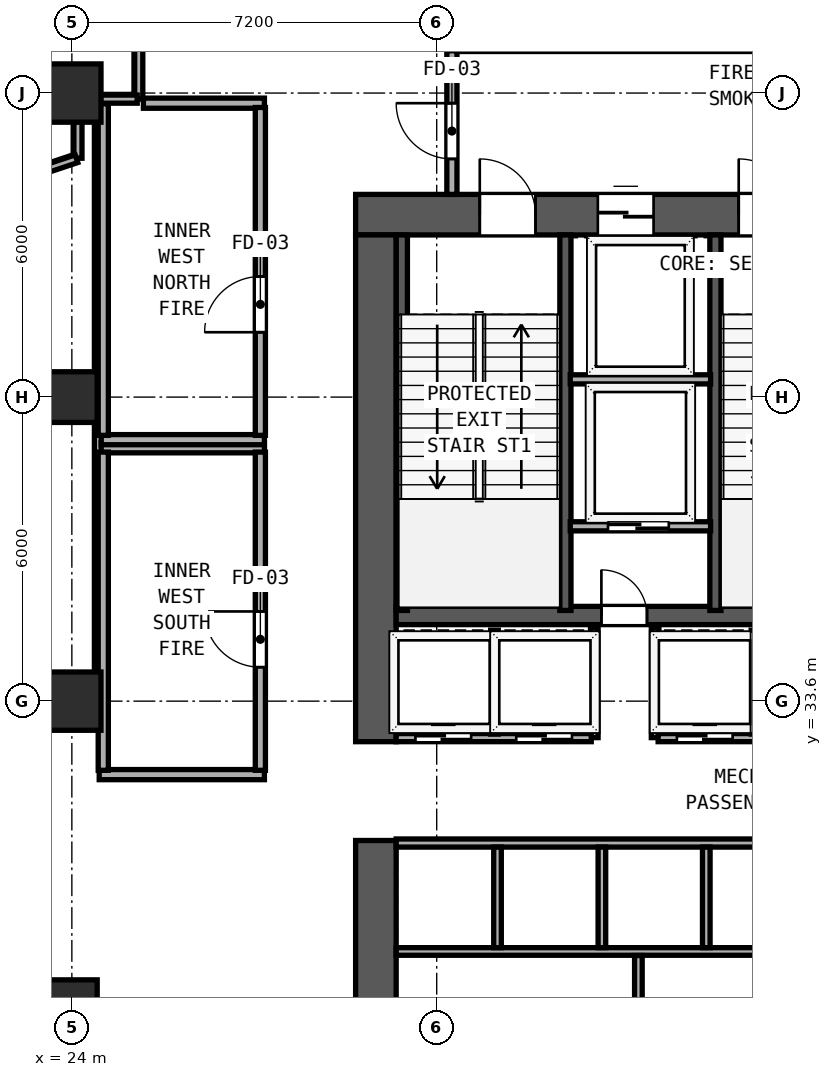
"""IFC4 building model, lengths in metres.
Left out: names, types, materials, properties, quantities, classifications, styles, units other than length and angle.
Written with IfcOpenShell. Run it as: python <this file> out.ifc"""

import sys

from ifc_helpers import new_model, si_unit, direction, frame, frame_2d, origin, origin_2d, place, context, subcontext, project, spatial, rectangle, hollow_rectangle, extrude, element, fill, save


model = new_model("IFC4")
c1 = context("Model", 3, precision=1e-05, world=origin(), true_north=direction((0.0, 1.0)))
c2 = subcontext(c1, "Body", "Model", "MODEL_VIEW")
j1 = project(units=[si_unit("LENGTHUNIT", "METRE"), si_unit("PLANEANGLEUNIT", "RADIAN")], contexts=[c1])
p1 = place(None, origin())
s1 = spatial("IfcSite", under=j1, at=p1, CompositionType="ELEMENT")
p2 = place(p1, origin())
s2 = spatial("IfcBuilding", under=s1, at=p2, CompositionType="ELEMENT")
p3 = place(p2, frame((0.0, 0.0, 89.4)))
s3 = spatial("IfcBuildingStorey", under=s2, at=p3, CompositionType="ELEMENT", Elevation=89.4)
p4 = place(p3, frame((29.6, 43.2, 0.0), z_axis=(0.0, 0.0, 1.0), x_axis=(1.0, 0.0, 0.0)))
e1 = element("IfcWall", 1, at=p4, inside=s3, PredefinedType="SHEAR", context=c2, shape_type="SweptSolid", body=[
    extrude(rectangle(XDim=17.6, YDim=0.8, at=frame_2d((8.8, 0.0))), origin(), (0.0, 0.0, 1.0), 4.35),
])
p5 = place(p4, frame((2.45, 0.0, 0.0)))
e2 = element("IfcOpeningElement", 2, at=p5, cuts=e1, PredefinedType="OPENING", context=c2, shape_type="SweptSolid", body=[
    extrude(rectangle(XDim=1.1, YDim=2.15, at=frame_2d((0.55, 1.075))), frame((0.0, 0.41, 0.0), z_axis=(0.0, -1.0, 0.0), x_axis=(1.0, 0.0, 0.0)), (0.0, 0.0, 1.0), 0.82),
])
p6 = place(p4, frame((7.56, 0.0, 0.0)))
e3 = element("IfcOpeningElement", 3, at=p6, cuts=e1, PredefinedType="OPENING", context=c2, shape_type="SweptSolid", body=[
    extrude(rectangle(XDim=1.1, YDim=2.15, at=frame_2d((0.55, 1.075))), frame((0.0, 0.41, 0.0), z_axis=(0.0, -1.0, 0.0), x_axis=(1.0, 0.0, 0.0)), (0.0, 0.0, 1.0), 0.82),
])
p7 = place(p4, frame((13.65, 0.0, 0.0)))
e4 = element("IfcOpeningElement", 4, at=p7, cuts=e1, PredefinedType="OPENING", context=c2, shape_type="SweptSolid", body=[
    extrude(rectangle(XDim=1.1, YDim=2.15, at=frame_2d((0.55, 1.075))), frame((0.0, 0.41, 0.0), z_axis=(0.0, -1.0, 0.0), x_axis=(1.0, 0.0, 0.0)), (0.0, 0.0, 1.0), 0.82),
])
p8 = place(p4, frame((4.78, 0.0, 0.0)))
e5 = element("IfcOpeningElement", 5, at=p8, cuts=e1, PredefinedType="OPENING", context=c2, shape_type="SweptSolid", body=[
    extrude(rectangle(XDim=1.1, YDim=2.2, at=frame_2d((0.55, 1.1))), frame((0.0, 0.41, 0.0), z_axis=(0.0, -1.0, 0.0), x_axis=(1.0, 0.0, 0.0)), (0.0, 0.0, 1.0), 0.82),
])
p9 = place(p4, frame((11.14, 0.0, 0.0)))
e6 = element("IfcOpeningElement", 6, at=p9, cuts=e1, PredefinedType="OPENING", context=c2, shape_type="SweptSolid", body=[
    extrude(rectangle(XDim=1.1, YDim=2.2, at=frame_2d((0.55, 1.1))), frame((0.0, 0.41, 0.0), z_axis=(0.0, -1.0, 0.0), x_axis=(1.0, 0.0, 0.0)), (0.0, 0.0, 1.0), 0.82),
])
p10 = place(p3, frame((30.0, 26.8, 0.0), z_axis=(0.0, 0.0, 1.0), x_axis=(0.0, 1.0, 0.0)))
e7 = element("IfcWall", 7, at=p10, inside=s3, PredefinedType="SHEAR", context=c2, shape_type="SweptSolid", body=[
    extrude(rectangle(XDim=4.05, YDim=0.8, at=frame_2d((2.025, 0.0))), origin(), (0.0, 0.0, 1.0), 4.35),
])
p11 = place(p3, frame((30.0, 32.8, 0.0), z_axis=(0.0, 0.0, 1.0), x_axis=(0.0, 1.0, 0.0)))
e8 = element("IfcWall", 8, at=p11, inside=s3, PredefinedType="SHEAR", context=c2, shape_type="SweptSolid", body=[
    extrude(rectangle(XDim=10.0, YDim=0.8, at=frame_2d((5.0, 0.0))), origin(), (0.0, 0.0, 1.0), 4.35),
])
p12 = place(p3, frame((30.4, 35.29, 0.0), z_axis=(0.0, 0.0, 1.0), x_axis=(1.0, 0.0, 0.0)))
e9 = element("IfcWall", 9, at=p12, inside=s3, PredefinedType="SHEAR", context=c2, shape_type="SweptSolid", body=[
    extrude(rectangle(XDim=16.0, YDim=0.36, at=frame_2d((8.0, 0.0))), origin(), (0.0, 0.0, 1.0), 4.35),
])
p13 = place(p12, frame((4.95, 0.0, 0.0), z_axis=(0.0, 0.0, 1.0), x_axis=(-1.0, 0.0, 0.0)))
e10 = element("IfcOpeningElement", 10, at=p13, cuts=e9, PredefinedType="OPENING", context=c2, shape_type="SweptSolid", body=[
    extrude(rectangle(XDim=0.9, YDim=2.1, at=frame_2d((0.45, 1.05))), frame((0.0, 0.19, 0.0), z_axis=(0.0, -1.0, 0.0), x_axis=(1.0, 0.0, 0.0)), (0.0, 0.0, 1.0), 0.38),
])
p14 = place(p12, frame((12.01, 0.0, 0.0), z_axis=(0.0, 0.0, 1.0), x_axis=(-1.0, 0.0, 0.0)))
e11 = element("IfcOpeningElement", 11, at=p14, cuts=e9, PredefinedType="OPENING", context=c2, shape_type="SweptSolid", body=[
    extrude(rectangle(XDim=0.9, YDim=2.1, at=frame_2d((0.45, 1.05))), frame((0.0, 0.19, 0.0), z_axis=(0.0, -1.0, 0.0), x_axis=(1.0, 0.0, 0.0)), (0.0, 0.0, 1.0), 0.38),
])
for number, where, z_axis, x_axis in (
    (12, (30.512, 35.39, 0.0), (0.0, 0.0, 1.0), (0.0, 1.0, 0.0)),
    (13, (33.74, 35.39, 0.0), (0.0, 0.0, 1.0), (0.0, 1.0, 0.0)),
    (14, (36.7, 35.39, 0.0), (0.0, 0.0, 1.0), (0.0, 1.0, 0.0)),
):
    element("IfcWall", number, at=place(p3, frame(where, z_axis=z_axis, x_axis=x_axis)), inside=s3, PredefinedType="SHEAR", context=c2, shape_type="SweptSolid", body=[
        extrude(rectangle(XDim=7.41, YDim=0.22, at=frame_2d((3.705, 0.0))), origin(), (0.0, 0.0, 1.0), 4.35),
    ])
for number, where, z_axis, x_axis in (
    (15, (24.0, 33.6, 0.0), (0.0, 0.0, 1.0), (1.0, 0.0, 0.0)),
    (16, (24.0, 45.6, 0.0), (0.0, 0.0, 1.0), (1.0, 0.0, 0.0)),
):
    element("IfcColumn", number, at=place(p3, frame(where, z_axis=z_axis, x_axis=x_axis)), inside=s3, PredefinedType="COLUMN", context=c2, shape_type="SweptSolid", body=[
        extrude(hollow_rectangle(XDim=1.15, YDim=1.15, WallThickness=0.042, at=origin_2d()), origin(), (0.0, 0.0, 1.0), 4.6),
    ])
for number, where, z_axis, x_axis in (
    (17, (24.0, 27.6, 0.0), (0.0, 0.0, 1.0), (1.0, 0.0, 0.0)),
    (18, (24.0, 39.6, 0.0), (0.0, 0.0, 1.0), (1.0, 0.0, 0.0)),
):
    element("IfcColumn", number, at=place(p3, frame(where, z_axis=z_axis, x_axis=x_axis)), inside=s3, PredefinedType="COLUMN", context=c2, shape_type="SweptSolid", body=[
        extrude(hollow_rectangle(XDim=1.0, YDim=1.0, WallThickness=0.038, at=origin_2d()), origin(), (0.0, 0.0, 1.0), 4.6),
    ])
p15 = place(p3, frame((25.32, 46.65, 0.0), z_axis=(0.0, 0.0, 1.0), x_axis=(0.0, -1.0, 0.0)))
e19 = element("IfcWall", 19, at=p15, inside=s3, PredefinedType="PARAPET", context=c2, shape_type="SweptSolid", body=[
    extrude(rectangle(XDim=1.17, YDim=0.16, at=frame_2d((0.585, 0.0))), origin(), (0.0, 0.0, 1.0), 1.15),
])
p16 = place(p3, frame((25.29, 45.48, 0.0), z_axis=(0.0, 0.0, 1.0), x_axis=(-1.0, 0.0, 0.0)))
e20 = element("IfcWall", 20, at=p16, inside=s3, PredefinedType="PARAPET", context=c2, shape_type="SweptSolid", body=[
    extrude(rectangle(XDim=0.723, YDim=0.16, at=frame_2d((0.362, 0.0))), origin(), (0.0, 0.0, 1.0), 1.15),
])
p17 = place(p3, frame((24.12, 45.033, 0.0), z_axis=(0.0, 0.0, 1.0), x_axis=(0.0, -1.0, 0.0)))
e21 = element("IfcWall", 21, at=p17, inside=s3, PredefinedType="PARAPET", context=c2, shape_type="SweptSolid", body=[
    extrude(rectangle(XDim=0.719, YDim=0.16, at=frame_2d((0.36, 0.0))), origin(), (0.0, 0.0, 1.0), 1.15),
])
p18 = place(p3, frame((24.092, 44.304, 0.0), z_axis=(0.0, 0.0, 1.0), x_axis=(-0.948683298051, -0.316227766017, 0.0)))
e22 = element("IfcWall", 22, at=p18, inside=s3, PredefinedType="PARAPET", context=c2, shape_type="SweptSolid", body=[
    extrude(rectangle(XDim=5.73, YDim=0.16, at=frame_2d((2.865, 0.0))), origin(), (0.0, 0.0, 1.0), 1.15),
])
p19 = place(p3, frame((31.5, 43.6, 0.0), z_axis=(0.0, 0.0, 1.0), x_axis=(0.0, 1.0, 0.0)))
e23 = element("IfcWall", 23, at=p19, inside=s3, PredefinedType="SOLIDWALL", context=c2, shape_type="SweptSolid", body=[
    extrude(rectangle(XDim=2.835, YDim=0.2, at=frame_2d((1.417, 0.0))), origin(), (0.0, 0.0, 1.0), 4.35),
])
p20 = place(p19, frame((1.8, 0.0, 0.0), z_axis=(0.0, 0.0, 1.0), x_axis=(-1.0, 0.0, 0.0)))
e24 = element("IfcOpeningElement", 24, at=p20, cuts=e23, PredefinedType="OPENING", context=c2, shape_type="SweptSolid", body=[
    extrude(rectangle(XDim=1.1, YDim=2.15, at=frame_2d((0.55, 1.075))), frame((0.0, 0.11, 0.0), z_axis=(0.0, -1.0, 0.0), x_axis=(1.0, 0.0, 0.0)), (0.0, 0.0, 1.0), 0.22),
])
p21 = place(p3, frame((33.835, 39.95, 0.0), z_axis=(0.0, 0.0, 1.0), x_axis=(1.0, 0.0, 0.0)))
e25 = element("IfcWall", 25, at=p21, inside=s3, PredefinedType="SOLIDWALL", context=c2, shape_type="SweptSolid", body=[
    extrude(rectangle(XDim=2.77, YDim=0.18, at=frame_2d((1.385, 0.0))), origin(), (0.0, 0.0, 1.0), 4.35),
])
p22 = place(p3, frame((33.835, 37.05, 0.0), z_axis=(0.0, 0.0, 1.0), x_axis=(1.0, 0.0, 0.0)))
e26 = element("IfcWall", 26, at=p22, inside=s3, PredefinedType="SOLIDWALL", context=c2, shape_type="SweptSolid", body=[
    extrude(rectangle(XDim=2.77, YDim=0.18, at=frame_2d((1.385, 0.0))), origin(), (0.0, 0.0, 1.0), 4.35),
])
p23 = place(p22, frame((1.945, 0.0, 0.0), z_axis=(0.0, 0.0, 1.0), x_axis=(-1.0, 0.0, 0.0)))
e27 = element("IfcOpeningElement", 27, at=p23, cuts=e26, PredefinedType="OPENING", context=c2, shape_type="SweptSolid", body=[
    extrude(rectangle(XDim=1.2, YDim=2.2, at=frame_2d((0.6, 1.1))), frame((0.0, 0.1, 0.0), z_axis=(0.0, -1.0, 0.0), x_axis=(1.0, 0.0, 0.0)), (0.0, 0.0, 1.0), 0.2),
])
for number, where, z_axis, x_axis in (
    (28, (34.31, 32.88, 0.0), (0.0, 0.0, 1.0), (0.0, 1.0, 0.0)),
    (29, (35.51, 32.88, 0.0), (0.0, 0.0, 1.0), (0.0, 1.0, 0.0)),
):
    element("IfcWall", number, at=place(p3, frame(where, z_axis=z_axis, x_axis=x_axis)), inside=s3, PredefinedType="SOLIDWALL", context=c2, shape_type="SweptSolid", body=[
        extrude(rectangle(XDim=2.17, YDim=0.15, at=frame_2d((1.085, 0.0))), origin(), (0.0, 0.0, 1.0), 4.35),
    ])
p24 = place(p3, frame((30.4, 32.88, 0.0), z_axis=(0.0, 0.0, 1.0), x_axis=(1.0, 0.0, 0.0)))
e30 = element("IfcWall", 30, at=p24, inside=s3, PredefinedType="SOLIDWALL", context=c2, shape_type="SweptSolid", body=[
    extrude(rectangle(XDim=3.85, YDim=0.16, at=frame_2d((1.925, 0.0))), origin(), (0.0, 0.0, 1.0), 4.35),
])
p25 = place(p24, frame((1.48, 0.0, 0.0), z_axis=(0.0, 0.0, 1.0), x_axis=(-1.0, 0.0, 0.0)))
e31 = element("IfcOpeningElement", 31, at=p25, cuts=e30, PredefinedType="OPENING", context=c2, shape_type="SweptSolid", body=[
    extrude(rectangle(XDim=1.1, YDim=2.2, at=frame_2d((0.55, 1.1))), frame((0.0, 0.09, 0.0), z_axis=(0.0, -1.0, 0.0), x_axis=(1.0, 0.0, 0.0)), (0.0, 0.0, 1.0), 0.18),
])
p26 = place(p24, frame((3.47, 0.0, 0.0), z_axis=(0.0, 0.0, 1.0), x_axis=(-1.0, 0.0, 0.0)))
e32 = element("IfcOpeningElement", 32, at=p26, cuts=e30, PredefinedType="OPENING", context=c2, shape_type="SweptSolid", body=[
    extrude(rectangle(XDim=1.1, YDim=2.2, at=frame_2d((0.55, 1.1))), frame((0.0, 0.09, 0.0), z_axis=(0.0, -1.0, 0.0), x_axis=(1.0, 0.0, 0.0)), (0.0, 0.0, 1.0), 0.18),
])
p27 = place(p3, frame((35.57, 32.88, 0.0), z_axis=(0.0, 0.0, 1.0), x_axis=(1.0, 0.0, 0.0)))
e33 = element("IfcWall", 33, at=p27, inside=s3, PredefinedType="SOLIDWALL", context=c2, shape_type="SweptSolid", body=[
    extrude(rectangle(XDim=5.74, YDim=0.16, at=frame_2d((2.87, 0.0))), origin(), (0.0, 0.0, 1.0), 4.35),
])
p28 = place(p27, frame((1.47, 0.0, 0.0), z_axis=(0.0, 0.0, 1.0), x_axis=(-1.0, 0.0, 0.0)))
e34 = element("IfcOpeningElement", 34, at=p28, cuts=e33, PredefinedType="OPENING", context=c2, shape_type="SweptSolid", body=[
    extrude(rectangle(XDim=1.1, YDim=2.2, at=frame_2d((0.55, 1.1))), frame((0.0, 0.09, 0.0), z_axis=(0.0, -1.0, 0.0), x_axis=(1.0, 0.0, 0.0)), (0.0, 0.0, 1.0), 0.18),
])
p29 = place(p27, frame((3.46, 0.0, 0.0), z_axis=(0.0, 0.0, 1.0), x_axis=(-1.0, 0.0, 0.0)))
e35 = element("IfcOpeningElement", 35, at=p29, cuts=e33, PredefinedType="OPENING", context=c2, shape_type="SweptSolid", body=[
    extrude(rectangle(XDim=1.1, YDim=2.2, at=frame_2d((0.55, 1.1))), frame((0.0, 0.09, 0.0), z_axis=(0.0, -1.0, 0.0), x_axis=(1.0, 0.0, 0.0)), (0.0, 0.0, 1.0), 0.18),
])
for number, where, z_axis, x_axis in (
    (36, (32.34, 32.95, 0.0), (0.0, 0.0, 1.0), (0.0, 1.0, 0.0)),
    (37, (37.48, 32.95, 0.0), (0.0, 0.0, 1.0), (0.0, 1.0, 0.0)),
):
    element("IfcWall", number, at=place(p3, frame(where, z_axis=z_axis, x_axis=x_axis)), inside=s3, PredefinedType="SOLIDWALL", context=c2, shape_type="SweptSolid", body=[
        extrude(rectangle(XDim=2.05, YDim=0.15, at=frame_2d((1.025, 0.0))), origin(), (0.0, 0.0, 1.0), 4.35),
    ])
p30 = place(p3, frame((30.4, 30.8, 0.0), z_axis=(0.0, 0.0, 1.0), x_axis=(1.0, 0.0, 0.0)))
e38 = element("IfcWall", 38, at=p30, inside=s3, PredefinedType="SOLIDWALL", context=c2, shape_type="SweptSolid", body=[
    extrude(rectangle(XDim=16.0, YDim=0.16, at=frame_2d((8.0, 0.0))), origin(), (0.0, 0.0, 1.0), 4.35),
])
p31 = place(p3, frame((30.4, 28.66, 0.0), z_axis=(0.0, 0.0, 1.0), x_axis=(1.0, 0.0, 0.0)))
e39 = element("IfcWall", 39, at=p31, inside=s3, PredefinedType="PARTITIONING", context=c2, shape_type="SweptSolid", body=[
    extrude(rectangle(XDim=16.0, YDim=0.15, at=frame_2d((8.0, 0.0))), origin(), (0.0, 0.0, 1.0), 4.35),
])
for number, where, z_axis, x_axis in (
    (40, (32.4, 28.735, 0.0), (0.0, 0.0, 1.0), (0.0, 1.0, 0.0)),
    (41, (34.46, 28.735, 0.0), (0.0, 0.0, 1.0), (0.0, 1.0, 0.0)),
    (42, (36.52, 28.735, 0.0), (0.0, 0.0, 1.0), (0.0, 1.0, 0.0)),
):
    element("IfcWall", number, at=place(p3, frame(where, z_axis=z_axis, x_axis=x_axis)), inside=s3, PredefinedType="SOLIDWALL", context=c2, shape_type="SweptSolid", body=[
        extrude(rectangle(XDim=1.985, YDim=0.15, at=frame_2d((0.992, 0.0))), origin(), (0.0, 0.0, 1.0), 4.35),
    ])
p32 = place(p3, frame((35.18, 26.81, 0.0), z_axis=(0.0, 0.0, 1.0), x_axis=(0.0, 1.0, 0.0)))
e43 = element("IfcWall", 43, at=p32, inside=s3, PredefinedType="PARTITIONING", context=c2, shape_type="SweptSolid", body=[
    extrude(rectangle(XDim=1.77, YDim=0.15, at=frame_2d((0.885, 0.0))), origin(), (0.0, 0.0, 1.0), 4.35),
])
p33 = place(p3, frame((24.52, 33.6, 0.0), z_axis=(0.0, 0.0, 1.0), x_axis=(0.0, 1.0, 0.0)))
e44 = element("IfcWall", 44, at=p33, inside=s3, PredefinedType="PARTITIONING", context=c2, shape_type="SweptSolid", body=[
    extrude(rectangle(XDim=11.788, YDim=0.15, at=frame_2d((5.894, 0.0))), origin(), (0.0, 0.0, 1.0), 4.35),
])
p34 = place(p3, frame((24.58, 38.6, 0.0), z_axis=(0.0, 0.0, 1.0), x_axis=(1.0, 0.0, 0.0)))
e45 = element("IfcWall", 45, at=p34, inside=s3, PredefinedType="SOLIDWALL", context=c2, shape_type="SweptSolid", body=[
    extrude(rectangle(XDim=3.22, YDim=0.2, at=frame_2d((1.61, 0.0))), origin(), (0.0, 0.0, 1.0), 4.35),
])
p35 = place(p3, frame((24.54, 32.15, 0.0), z_axis=(0.0, 0.0, 1.0), x_axis=(1.0, 0.0, 0.0)))
e46 = element("IfcWall", 46, at=p35, inside=s3, PredefinedType="SOLIDWALL", context=c2, shape_type="SweptSolid", body=[
    extrude(rectangle(XDim=3.26, YDim=0.2, at=frame_2d((1.63, 0.0))), origin(), (0.0, 0.0, 1.0), 4.35),
])
p36 = place(p3, frame((24.62, 32.235, 0.0), z_axis=(0.0, 0.0, 1.0), x_axis=(0.0, 1.0, 0.0)))
e47 = element("IfcWall", 47, at=p36, inside=s3, PredefinedType="SOLIDWALL", context=c2, shape_type="SweptSolid", body=[
    extrude(rectangle(XDim=6.28, YDim=0.2, at=frame_2d((3.14, 0.0))), origin(), (0.0, 0.0, 1.0), 4.35),
])
p37 = place(p3, frame((27.72, 32.235, 0.0), z_axis=(0.0, 0.0, 1.0), x_axis=(0.0, 1.0, 0.0)))
e48 = element("IfcWall", 48, at=p37, inside=s3, PredefinedType="SOLIDWALL", context=c2, shape_type="SweptSolid", body=[
    extrude(rectangle(XDim=6.28, YDim=0.2, at=frame_2d((3.14, 0.0))), origin(), (0.0, 0.0, 1.0), 4.35),
])
p38 = place(p37, frame((3.135, 0.0, 0.0), z_axis=(0.0, 0.0, 1.0), x_axis=(-1.0, 0.0, 0.0)))
e49 = element("IfcOpeningElement", 49, at=p38, cuts=e48, PredefinedType="OPENING", context=c2, shape_type="SweptSolid", body=[
    extrude(rectangle(XDim=1.1, YDim=2.15, at=frame_2d((0.55, 1.075))), frame((0.0, 0.11, 0.0), z_axis=(0.0, -1.0, 0.0), x_axis=(1.0, 0.0, 0.0)), (0.0, 0.0, 1.0), 0.22),
])
p39 = place(p3, frame((25.412, 45.4, 0.0), z_axis=(0.0, 0.0, 1.0), x_axis=(1.0, 0.0, 0.0)))
e50 = element("IfcWall", 50, at=p39, inside=s3, PredefinedType="SOLIDWALL", context=c2, shape_type="SweptSolid", body=[
    extrude(rectangle(XDim=2.388, YDim=0.2, at=frame_2d((1.194, 0.0))), origin(), (0.0, 0.0, 1.0), 4.35),
])
p40 = place(p3, frame((24.58, 38.76, 0.0), z_axis=(0.0, 0.0, 1.0), x_axis=(1.0, 0.0, 0.0)))
e51 = element("IfcWall", 51, at=p40, inside=s3, PredefinedType="SOLIDWALL", context=c2, shape_type="SweptSolid", body=[
    extrude(rectangle(XDim=3.22, YDim=0.2, at=frame_2d((1.61, 0.0))), origin(), (0.0, 0.0, 1.0), 4.35),
])
p41 = place(p3, frame((24.62, 38.845, 0.0), z_axis=(0.0, 0.0, 1.0), x_axis=(0.0, 1.0, 0.0)))
e52 = element("IfcWall", 52, at=p41, inside=s3, PredefinedType="SOLIDWALL", context=c2, shape_type="SweptSolid", body=[
    extrude(rectangle(XDim=6.543, YDim=0.2, at=frame_2d((3.271, 0.0))), origin(), (0.0, 0.0, 1.0), 4.35),
])
p42 = place(p3, frame((27.72, 38.845, 0.0), z_axis=(0.0, 0.0, 1.0), x_axis=(0.0, 1.0, 0.0)))
e53 = element("IfcWall", 53, at=p42, inside=s3, PredefinedType="SOLIDWALL", context=c2, shape_type="SweptSolid", body=[
    extrude(rectangle(XDim=6.47, YDim=0.2, at=frame_2d((3.235, 0.0))), origin(), (0.0, 0.0, 1.0), 4.35),
])
p43 = place(p42, frame((3.135, 0.0, 0.0), z_axis=(0.0, 0.0, 1.0), x_axis=(-1.0, 0.0, 0.0)))
e54 = element("IfcOpeningElement", 54, at=p43, cuts=e53, PredefinedType="OPENING", context=c2, shape_type="SweptSolid", body=[
    extrude(rectangle(XDim=1.1, YDim=2.15, at=frame_2d((0.55, 1.075))), frame((0.0, 0.11, 0.0), z_axis=(0.0, -1.0, 0.0), x_axis=(1.0, 0.0, 0.0)), (0.0, 0.0, 1.0), 0.22),
])
p44 = place(p5, origin())
e55 = element("IfcDoor", 55, at=p44, inside=s3, OperationType="SINGLE_SWING_LEFT", PredefinedType="DOOR", context=c2, shape_type="SweptSolid", body=[
    extrude(rectangle(XDim=1.1, YDim=2.15, at=frame_2d((0.55, 1.075))), frame((0.0, 0.185, 0.0), z_axis=(0.0, -1.0, 0.0), x_axis=(1.0, 0.0, 0.0)), (0.0, 0.0, 1.0), 0.05),
])
fill(e2, e55)
p45 = place(p6, origin())
e56 = element("IfcDoor", 56, at=p45, inside=s3, OperationType="SINGLE_SWING_LEFT", PredefinedType="DOOR", context=c2, shape_type="SweptSolid", body=[
    extrude(rectangle(XDim=1.1, YDim=2.15, at=frame_2d((0.55, 1.075))), frame((0.0, 0.185, 0.0), z_axis=(0.0, -1.0, 0.0), x_axis=(1.0, 0.0, 0.0)), (0.0, 0.0, 1.0), 0.05),
])
fill(e3, e56)
p46 = place(p20, origin())
e57 = element("IfcDoor", 57, at=p46, inside=s3, OperationType="SINGLE_SWING_LEFT", PredefinedType="DOOR", context=c2, shape_type="SweptSolid", body=[
    extrude(rectangle(XDim=1.1, YDim=2.15, at=frame_2d((0.55, 1.075))), frame((0.0, 0.025, 0.0), z_axis=(0.0, -1.0, 0.0), x_axis=(1.0, 0.0, 0.0)), (0.0, 0.0, 1.0), 0.05),
])
fill(e24, e57)
p47 = place(p8, origin())
e58 = element("IfcDoor", 58, at=p47, inside=s3, OperationType="SLIDING_TO_LEFT", PredefinedType="DOOR", context=c2, shape_type="SweptSolid", body=[
    extrude(rectangle(XDim=1.1, YDim=2.2, at=frame_2d((0.55, 1.1))), frame((0.0, 0.185, 0.0), z_axis=(0.0, -1.0, 0.0), x_axis=(1.0, 0.0, 0.0)), (0.0, 0.0, 1.0), 0.05),
])
fill(e5, e58)
p48 = place(p23, origin())
e59 = element("IfcDoor", 59, at=p48, inside=s3, OperationType="SLIDING_TO_RIGHT", PredefinedType="DOOR", context=c2, shape_type="SweptSolid", body=[
    extrude(rectangle(XDim=1.2, YDim=2.2, at=frame_2d((0.6, 1.1))), frame((0.0, 0.025, 0.0), z_axis=(0.0, -1.0, 0.0), x_axis=(1.0, 0.0, 0.0)), (0.0, 0.0, 1.0), 0.05),
])
fill(e27, e59)
p49 = place(p13, origin())
e60 = element("IfcDoor", 60, at=p49, inside=s3, OperationType="SINGLE_SWING_RIGHT", PredefinedType="DOOR", context=c2, shape_type="SweptSolid", body=[
    extrude(rectangle(XDim=0.9, YDim=2.1, at=frame_2d((0.45, 1.05))), frame((0.0, 0.025, 0.0), z_axis=(0.0, -1.0, 0.0), x_axis=(1.0, 0.0, 0.0)), (0.0, 0.0, 1.0), 0.05),
])
fill(e10, e60)
p50 = place(p25, origin())
e61 = element("IfcDoor", 61, at=p50, inside=s3, OperationType="SLIDING_TO_LEFT", PredefinedType="DOOR", context=c2, shape_type="SweptSolid", body=[
    extrude(rectangle(XDim=1.1, YDim=2.2, at=frame_2d((0.55, 1.1))), frame((0.0, 0.025, 0.0), z_axis=(0.0, -1.0, 0.0), x_axis=(1.0, 0.0, 0.0)), (0.0, 0.0, 1.0), 0.05),
])
fill(e31, e61)
p51 = place(p26, origin())
e62 = element("IfcDoor", 62, at=p51, inside=s3, OperationType="SLIDING_TO_LEFT", PredefinedType="DOOR", context=c2, shape_type="SweptSolid", body=[
    extrude(rectangle(XDim=1.1, YDim=2.2, at=frame_2d((0.55, 1.1))), frame((0.0, 0.025, 0.0), z_axis=(0.0, -1.0, 0.0), x_axis=(1.0, 0.0, 0.0)), (0.0, 0.0, 1.0), 0.05),
])
fill(e32, e62)
p52 = place(p28, origin())
e63 = element("IfcDoor", 63, at=p52, inside=s3, OperationType="SLIDING_TO_LEFT", PredefinedType="DOOR", context=c2, shape_type="SweptSolid", body=[
    extrude(rectangle(XDim=1.1, YDim=2.2, at=frame_2d((0.55, 1.1))), frame((0.0, 0.025, 0.0), z_axis=(0.0, -1.0, 0.0), x_axis=(1.0, 0.0, 0.0)), (0.0, 0.0, 1.0), 0.05),
])
fill(e34, e63)
p53 = place(p38, origin())
e64 = element("IfcDoor", 64, at=p53, inside=s3, OperationType="SINGLE_SWING_LEFT", PredefinedType="DOOR", context=c2, shape_type="SweptSolid", body=[
    extrude(rectangle(XDim=1.1, YDim=2.15, at=frame_2d((0.55, 1.075))), frame((0.0, 0.025, 0.0), z_axis=(0.0, -1.0, 0.0), x_axis=(1.0, 0.0, 0.0)), (0.0, 0.0, 1.0), 0.05),
])
fill(e49, e64)
p54 = place(p43, origin())
e65 = element("IfcDoor", 65, at=p54, inside=s3, OperationType="SINGLE_SWING_RIGHT", PredefinedType="DOOR", context=c2, shape_type="SweptSolid", body=[
    extrude(rectangle(XDim=1.1, YDim=2.15, at=frame_2d((0.55, 1.075))), frame((0.0, 0.025, 0.0), z_axis=(0.0, -1.0, 0.0), x_axis=(1.0, 0.0, 0.0)), (0.0, 0.0, 1.0), 0.05),
])
fill(e54, e65)
save(model, sys.argv[1])
